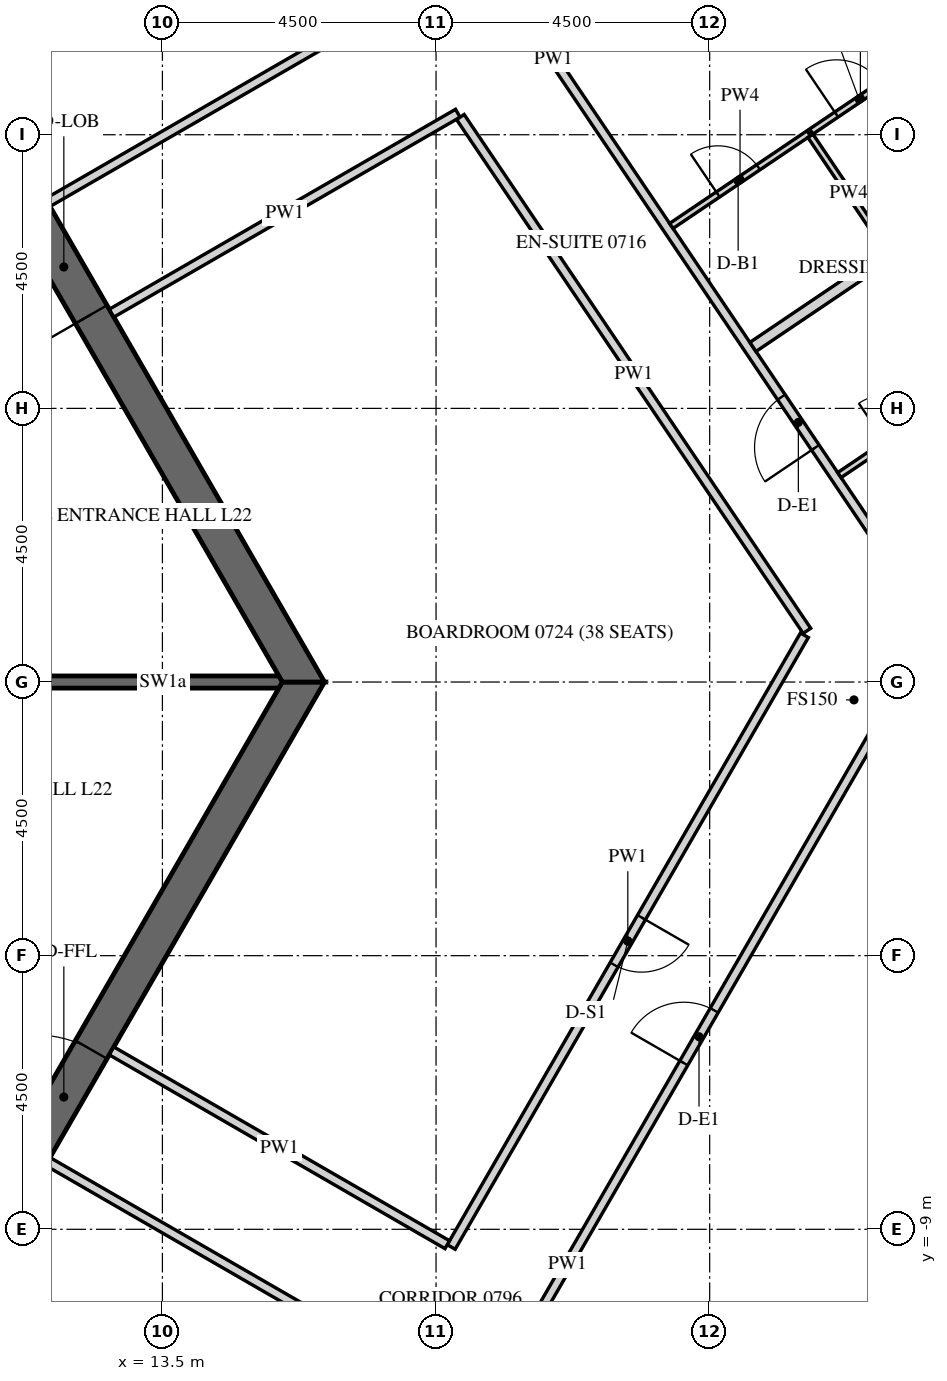
"""IFC4 building model, lengths in metres.
Left out: names, types, materials, properties, quantities, classifications, styles, units other than length and angle.
Written with IfcOpenShell. Run it as: python <this file> out.ifc"""

import sys

from ifc_helpers import new_model, si_unit, direction, frame, frame_2d, origin, place, context, subcontext, project, spatial, polyline, rectangle, outline, extrude, element, fill, save


model = new_model("IFC4")
c1 = context("Model", 3, precision=1e-05, world=origin(), true_north=direction((0.0, 1.0)))
c2 = subcontext(c1, "Body", "Model", "MODEL_VIEW")
j1 = project(units=[si_unit("LENGTHUNIT", "METRE"), si_unit("PLANEANGLEUNIT", "RADIAN")], contexts=[c1])
p1 = place(None, origin())
s1 = spatial("IfcSite", under=j1, at=p1, CompositionType="ELEMENT")
p2 = place(p1, origin())
s2 = spatial("IfcBuilding", under=s1, at=p2, CompositionType="ELEMENT")
p3 = place(p2, frame((0.0, 0.0, 99.9)))
s3 = spatial("IfcBuildingStorey", under=s2, at=p3, CompositionType="ELEMENT", Elevation=99.9)
p4 = place(p3, frame((18.83, -26.835, -0.15), z_axis=(0.0, 0.0, 1.0), x_axis=(0.500003800416, 0.866023209602, 0.0)))
e1 = element("IfcWall", 1, at=p4, inside=s3, PredefinedType="SOLIDWALL", context=c2, shape_type="SweptSolid", body=[
    extrude(outline(polyline([(-0.022, -0.275), (30.097, -0.275), (30.045, 0.275), (0.022, 0.275), (-0.022, -0.275)])), origin(), (0.0, 0.0, 1.0), 3.9),
])
p5 = place(p4, frame((1.236, 0.0, 1.05)))
e2 = element("IfcOpeningElement", 2, at=p5, cuts=e1, PredefinedType="OPENING", context=c2, shape_type="SweptSolid", body=[
    extrude(rectangle(XDim=2.4, YDim=2.4, at=frame_2d((1.2, 1.2))), frame((0.0, 0.285, 0.0), z_axis=(0.0, -1.0, 0.0), x_axis=(1.0, 0.0, 0.0)), (0.0, 0.0, 1.0), 0.57),
])
p6 = place(p4, frame((4.835, 0.0, 1.05)))
e3 = element("IfcOpeningElement", 3, at=p6, cuts=e1, PredefinedType="OPENING", context=c2, shape_type="SweptSolid", body=[
    extrude(rectangle(XDim=2.4, YDim=2.4, at=frame_2d((1.2, 1.2))), frame((0.0, 0.285, 0.0), z_axis=(0.0, -1.0, 0.0), x_axis=(1.0, 0.0, 0.0)), (0.0, 0.0, 1.0), 0.57),
])
p7 = place(p4, frame((8.436, 0.0, 1.05)))
e4 = element("IfcOpeningElement", 4, at=p7, cuts=e1, PredefinedType="OPENING", context=c2, shape_type="SweptSolid", body=[
    extrude(rectangle(XDim=2.4, YDim=2.4, at=frame_2d((1.2, 1.2))), frame((0.0, 0.285, 0.0), z_axis=(0.0, -1.0, 0.0), x_axis=(1.0, 0.0, 0.0)), (0.0, 0.0, 1.0), 0.57),
])
p8 = place(p4, frame((12.035, 0.0, 1.05)))
e5 = element("IfcOpeningElement", 5, at=p8, cuts=e1, PredefinedType="OPENING", context=c2, shape_type="SweptSolid", body=[
    extrude(rectangle(XDim=2.4, YDim=2.4, at=frame_2d((1.2, 1.2))), frame((0.0, 0.285, 0.0), z_axis=(0.0, -1.0, 0.0), x_axis=(1.0, 0.0, 0.0)), (0.0, 0.0, 1.0), 0.57),
])
p9 = place(p4, frame((15.635, 0.0, 1.05)))
e6 = element("IfcOpeningElement", 6, at=p9, cuts=e1, PredefinedType="OPENING", context=c2, shape_type="SweptSolid", body=[
    extrude(rectangle(XDim=2.4, YDim=2.4, at=frame_2d((1.2, 1.2))), frame((0.0, 0.285, 0.0), z_axis=(0.0, -1.0, 0.0), x_axis=(1.0, 0.0, 0.0)), (0.0, 0.0, 1.0), 0.57),
])
p10 = place(p4, frame((19.236, 0.0, 1.05)))
e7 = element("IfcOpeningElement", 7, at=p10, cuts=e1, PredefinedType="OPENING", context=c2, shape_type="SweptSolid", body=[
    extrude(rectangle(XDim=2.4, YDim=2.4, at=frame_2d((1.2, 1.2))), frame((0.0, 0.285, 0.0), z_axis=(0.0, -1.0, 0.0), x_axis=(1.0, 0.0, 0.0)), (0.0, 0.0, 1.0), 0.57),
])
p11 = place(p4, frame((22.835, 0.0, 1.05)))
e8 = element("IfcOpeningElement", 8, at=p11, cuts=e1, PredefinedType="OPENING", context=c2, shape_type="SweptSolid", body=[
    extrude(rectangle(XDim=2.4, YDim=2.4, at=frame_2d((1.2, 1.2))), frame((0.0, 0.285, 0.0), z_axis=(0.0, -1.0, 0.0), x_axis=(1.0, 0.0, 0.0)), (0.0, 0.0, 1.0), 0.57),
])
p12 = place(p4, frame((26.436, 0.0, 1.05)))
e9 = element("IfcOpeningElement", 9, at=p12, cuts=e1, PredefinedType="OPENING", context=c2, shape_type="SweptSolid", body=[
    extrude(rectangle(XDim=2.4, YDim=2.4, at=frame_2d((1.2, 1.2))), frame((0.0, 0.285, 0.0), z_axis=(0.0, -1.0, 0.0), x_axis=(1.0, 0.0, 0.0)), (0.0, 0.0, 1.0), 0.57),
])
p13 = place(p3, frame((33.728, 3.153, -0.15), z_axis=(0.0, 0.0, 1.0), x_axis=(-0.559192411416, 0.82903790445, 0.0)))
e10 = element("IfcWall", 10, at=p13, inside=s3, PredefinedType="SOLIDWALL", context=c2, shape_type="SweptSolid", body=[
    extrude(outline(polyline([(-0.026, -0.275), (30.093, -0.275), (30.048, 0.275), (0.026, 0.275), (-0.026, -0.275)])), origin(), (0.0, 0.0, 1.0), 3.9),
])
p14 = place(p13, frame((1.236, 0.0, 1.05)))
e11 = element("IfcOpeningElement", 11, at=p14, cuts=e10, PredefinedType="OPENING", context=c2, shape_type="SweptSolid", body=[
    extrude(rectangle(XDim=2.4, YDim=2.4, at=frame_2d((1.2, 1.2))), frame((0.0, 0.285, 0.0), z_axis=(0.0, -1.0, 0.0), x_axis=(1.0, 0.0, 0.0)), (0.0, 0.0, 1.0), 0.57),
])
p15 = place(p13, frame((4.835, 0.0, 1.05)))
e12 = element("IfcOpeningElement", 12, at=p15, cuts=e10, PredefinedType="OPENING", context=c2, shape_type="SweptSolid", body=[
    extrude(rectangle(XDim=2.4, YDim=2.4, at=frame_2d((1.2, 1.2))), frame((0.0, 0.285, 0.0), z_axis=(0.0, -1.0, 0.0), x_axis=(1.0, 0.0, 0.0)), (0.0, 0.0, 1.0), 0.57),
])
p16 = place(p13, frame((8.436, 0.0, 1.05)))
e13 = element("IfcOpeningElement", 13, at=p16, cuts=e10, PredefinedType="OPENING", context=c2, shape_type="SweptSolid", body=[
    extrude(rectangle(XDim=2.4, YDim=2.4, at=frame_2d((1.2, 1.2))), frame((0.0, 0.285, 0.0), z_axis=(0.0, -1.0, 0.0), x_axis=(1.0, 0.0, 0.0)), (0.0, 0.0, 1.0), 0.57),
])
p17 = place(p13, frame((12.035, 0.0, 1.05)))
e14 = element("IfcOpeningElement", 14, at=p17, cuts=e10, PredefinedType="OPENING", context=c2, shape_type="SweptSolid", body=[
    extrude(rectangle(XDim=2.4, YDim=2.4, at=frame_2d((1.2, 1.2))), frame((0.0, 0.285, 0.0), z_axis=(0.0, -1.0, 0.0), x_axis=(1.0, 0.0, 0.0)), (0.0, 0.0, 1.0), 0.57),
])
p18 = place(p13, frame((15.635, 0.0, 1.05)))
e15 = element("IfcOpeningElement", 15, at=p18, cuts=e10, PredefinedType="OPENING", context=c2, shape_type="SweptSolid", body=[
    extrude(rectangle(XDim=2.4, YDim=2.4, at=frame_2d((1.2, 1.2))), frame((0.0, 0.285, 0.0), z_axis=(0.0, -1.0, 0.0), x_axis=(1.0, 0.0, 0.0)), (0.0, 0.0, 1.0), 0.57),
])
p19 = place(p13, frame((19.236, 0.0, 1.05)))
e16 = element("IfcOpeningElement", 16, at=p19, cuts=e10, PredefinedType="OPENING", context=c2, shape_type="SweptSolid", body=[
    extrude(rectangle(XDim=2.4, YDim=2.4, at=frame_2d((1.2, 1.2))), frame((0.0, 0.285, 0.0), z_axis=(0.0, -1.0, 0.0), x_axis=(1.0, 0.0, 0.0)), (0.0, 0.0, 1.0), 0.57),
])
p20 = place(p13, frame((22.835, 0.0, 1.05)))
e17 = element("IfcOpeningElement", 17, at=p20, cuts=e10, PredefinedType="OPENING", context=c2, shape_type="SweptSolid", body=[
    extrude(rectangle(XDim=2.4, YDim=2.4, at=frame_2d((1.2, 1.2))), frame((0.0, 0.285, 0.0), z_axis=(0.0, -1.0, 0.0), x_axis=(1.0, 0.0, 0.0)), (0.0, 0.0, 1.0), 0.57),
])
p21 = place(p13, frame((26.436, 0.0, 1.05)))
e18 = element("IfcOpeningElement", 18, at=p21, cuts=e10, PredefinedType="OPENING", context=c2, shape_type="SweptSolid", body=[
    extrude(rectangle(XDim=2.4, YDim=2.4, at=frame_2d((1.2, 1.2))), frame((0.0, 0.285, 0.0), z_axis=(0.0, -1.0, 0.0), x_axis=(1.0, 0.0, 0.0)), (0.0, 0.0, 1.0), 0.57),
])
p22 = place(p3, frame((7.91, -13.7, -0.15), z_axis=(0.0, 0.0, 1.0), x_axis=(0.499999880136, 0.866025472988, 0.0)))
e19 = element("IfcWall", 19, at=p22, inside=s3, PredefinedType="SHEAR", context=c2, shape_type="SweptSolid", body=[
    extrude(outline(polyline([(-0.173, -0.3), (15.993, -0.3), (15.646, 0.3), (0.173, 0.3), (-0.173, -0.3)])), origin(), (0.0, 0.0, 1.0), 3.9),
])
p23 = place(p22, frame((7.039, 0.0, 0.15)))
e20 = element("IfcOpeningElement", 20, at=p23, cuts=e19, PredefinedType="OPENING", context=c2, shape_type="SweptSolid", body=[
    extrude(rectangle(XDim=1.8, YDim=2.4, at=frame_2d((0.9, 1.2))), frame((0.0, 0.31, 0.0), z_axis=(0.0, -1.0, 0.0), x_axis=(1.0, 0.0, 0.0)), (0.0, 0.0, 1.0), 0.62),
])
p24 = place(p3, frame((15.819, 0.0, -0.15), z_axis=(0.0, 0.0, 1.0), x_axis=(-0.499999880136, 0.866025472988, 0.0)))
e21 = element("IfcWall", 21, at=p24, inside=s3, PredefinedType="SHEAR", context=c2, shape_type="SweptSolid", body=[
    extrude(outline(polyline([(-0.173, -0.3), (15.993, -0.3), (15.646, 0.3), (0.173, 0.3), (-0.173, -0.3)])), origin(), (0.0, 0.0, 1.0), 3.9),
])
p25 = place(p24, frame((6.981, 0.0, 0.15)))
e22 = element("IfcOpeningElement", 22, at=p25, cuts=e21, PredefinedType="OPENING", context=c2, shape_type="SweptSolid", body=[
    extrude(rectangle(XDim=1.8, YDim=2.4, at=frame_2d((0.9, 1.2))), frame((0.0, 0.31, 0.0), z_axis=(0.0, -1.0, 0.0), x_axis=(1.0, 0.0, 0.0)), (0.0, 0.0, 1.0), 0.62),
])
p26 = place(p3, frame((11.547, 0.0, -0.15), z_axis=(0.0, 0.0, 1.0), x_axis=(1.0, 0.0, 0.0)))
e23 = element("IfcWall", 23, at=p26, inside=s3, PredefinedType="SHEAR", context=c2, shape_type="SweptSolid", body=[
    extrude(rectangle(XDim=3.926, YDim=0.2, at=frame_2d((1.963, 0.0))), origin(), (0.0, 0.0, 1.0), 3.9),
])
p27 = place(p3, frame((14.102, -20.075, 0.0), z_axis=(0.0, 0.0, 1.0), x_axis=(0.499996816197, 0.866027241946, 0.0)))
e24 = element("IfcWall", 24, at=p27, inside=s3, PredefinedType="PARTITIONING", context=c2, shape_type="SweptSolid", body=[
    extrude(rectangle(XDim=24.238, YDim=0.15, at=frame_2d((12.119, 0.0))), origin(), (0.0, 0.0, 1.0), 2.988),
])
p28 = place(p27, frame((4.729, 0.0, 0.0)))
e25 = element("IfcOpeningElement", 25, at=p28, cuts=e24, PredefinedType="OPENING", context=c2, shape_type="SweptSolid", body=[
    extrude(rectangle(XDim=1.0, YDim=2.1, at=frame_2d((0.5, 1.05))), frame((0.0, 0.085, 0.0), z_axis=(0.0, -1.0, 0.0), x_axis=(1.0, 0.0, 0.0)), (0.0, 0.0, 1.0), 0.17),
])
p29 = place(p27, frame((15.946, 0.0, 0.0)))
e26 = element("IfcOpeningElement", 26, at=p29, cuts=e24, PredefinedType="OPENING", context=c2, shape_type="SweptSolid", body=[
    extrude(rectangle(XDim=1.0, YDim=2.1, at=frame_2d((0.5, 1.05))), frame((0.0, 0.085, 0.0), z_axis=(0.0, -1.0, 0.0), x_axis=(1.0, 0.0, 0.0)), (0.0, 0.0, 1.0), 0.17),
])
p30 = place(p3, frame((26.174, 0.985, 0.0), z_axis=(0.0, 0.0, 1.0), x_axis=(-0.559192163771, 0.829038071488, 0.0)))
e27 = element("IfcWall", 27, at=p30, inside=s3, PredefinedType="PARTITIONING", context=c2, shape_type="SweptSolid", body=[
    extrude(rectangle(XDim=22.335, YDim=0.15, at=frame_2d((11.168, 0.0))), origin(), (0.0, 0.0, 1.0), 2.988),
])
p31 = place(p30, frame((3.463, 0.0, 0.0)))
e28 = element("IfcOpeningElement", 28, at=p31, cuts=e27, PredefinedType="OPENING", context=c2, shape_type="SweptSolid", body=[
    extrude(rectangle(XDim=1.0, YDim=2.1, at=frame_2d((0.5, 1.05))), frame((0.0, 0.085, 0.0), z_axis=(0.0, -1.0, 0.0), x_axis=(1.0, 0.0, 0.0)), (0.0, 0.0, 1.0), 0.17),
])
p32 = place(p30, frame((13.309, 0.0, 0.0)))
e29 = element("IfcOpeningElement", 29, at=p32, cuts=e27, PredefinedType="OPENING", context=c2, shape_type="SweptSolid", body=[
    extrude(rectangle(XDim=1.0, YDim=2.1, at=frame_2d((0.5, 1.05))), frame((0.0, 0.085, 0.0), z_axis=(0.0, -1.0, 0.0), x_axis=(1.0, 0.0, 0.0)), (0.0, 0.0, 1.0), 0.17),
])
p33 = place(p3, frame((12.664, 6.066, 0.0), z_axis=(0.0, 0.0, 1.0), x_axis=(0.866027295802, 0.499996722915, 0.0)))
e30 = element("IfcWall", 30, at=p33, inside=s3, PredefinedType="PARTITIONING", context=c2, shape_type="SweptSolid", body=[
    extrude(rectangle(XDim=6.575, YDim=0.15, at=frame_2d((3.288, 0.0))), origin(), (0.0, 0.0, 1.0), 2.988),
])
p34 = place(p3, frame((18.4, 9.291, 0.0), z_axis=(0.0, 0.0, 1.0), x_axis=(0.559191829043, -0.829038297265, 0.0)))
e31 = element("IfcWall", 31, at=p34, inside=s3, PredefinedType="PARTITIONING", context=c2, shape_type="SweptSolid", body=[
    extrude(rectangle(XDim=10.192, YDim=0.15, at=frame_2d((5.096, 0.0))), origin(), (0.0, 0.0, 1.0), 2.988),
])
p35 = place(p3, frame((24.058, 0.769, 0.0), z_axis=(0.0, 0.0, 1.0), x_axis=(-0.499995346943, -0.866028090212, 0.0)))
e32 = element("IfcWall", 32, at=p35, inside=s3, PredefinedType="PARTITIONING", context=c2, shape_type="SweptSolid", body=[
    extrude(rectangle(XDim=11.616, YDim=0.15, at=frame_2d((5.808, 0.0))), origin(), (0.0, 0.0, 1.0), 2.988),
])
p36 = place(p35, frame((5.358, 0.0, 0.0)))
e33 = element("IfcOpeningElement", 33, at=p36, cuts=e32, PredefinedType="OPENING", context=c2, shape_type="SweptSolid", body=[
    extrude(rectangle(XDim=0.9, YDim=2.1, at=frame_2d((0.45, 1.05))), frame((0.0, 0.085, 0.0), z_axis=(0.0, -1.0, 0.0), x_axis=(1.0, 0.0, 0.0)), (0.0, 0.0, 1.0), 0.17),
])
p37 = place(p3, frame((18.185, -9.253, 0.0), z_axis=(0.0, 0.0, 1.0), x_axis=(-0.866028703517, 0.499994284652, 0.0)))
e34 = element("IfcWall", 34, at=p37, inside=s3, PredefinedType="PARTITIONING", context=c2, shape_type="SweptSolid", body=[
    extrude(rectangle(XDim=6.375, YDim=0.15, at=frame_2d((3.188, 0.0))), origin(), (0.0, 0.0, 1.0), 2.988),
])
p38 = place(p3, frame((11.614, -7.884, 0.0), z_axis=(0.0, 0.0, 1.0), x_axis=(0.866021702275, -0.500006411147, 0.0)))
e35 = element("IfcWall", 35, at=p38, inside=s3, PredefinedType="PARTITIONING", context=c2, shape_type="SweptSolid", body=[
    extrude(rectangle(XDim=6.45, YDim=0.15, at=frame_2d((3.225, 0.0))), origin(), (0.0, 0.0, 1.0), 2.988),
])
p39 = place(p3, frame((17.116, 11.061, 0.0), z_axis=(0.0, 0.0, 1.0), x_axis=(-0.866021127751, -0.500007406234, 0.0)))
e36 = element("IfcWall", 36, at=p39, inside=s3, PredefinedType="PARTITIONING", context=c2, shape_type="SweptSolid", body=[
    extrude(rectangle(XDim=6.354, YDim=0.15, at=frame_2d((3.177, 0.0))), origin(), (0.0, 0.0, 1.0), 2.988),
])
p40 = place(p3, frame((24.633, 3.403, 0.0), z_axis=(0.0, 0.0, 1.0), x_axis=(0.829047014003, 0.559178905694, 0.0)))
e37 = element("IfcWall", 37, at=p40, inside=s3, PredefinedType="PARTITIONING", context=c2, shape_type="SweptSolid", body=[
    extrude(rectangle(XDim=2.725, YDim=0.1, at=frame_2d((1.362, 0.0))), origin(), (0.0, 0.0, 1.0), 2.988),
])
p41 = place(p40, frame((0.925, 0.0, 0.0)))
e38 = element("IfcOpeningElement", 38, at=p41, cuts=e37, PredefinedType="OPENING", context=c2, shape_type="SweptSolid", body=[
    extrude(rectangle(XDim=0.8, YDim=2.1, at=frame_2d((0.4, 1.05))), frame((0.0, 0.06, 0.0), z_axis=(0.0, -1.0, 0.0), x_axis=(1.0, 0.0, 0.0)), (0.0, 0.0, 1.0), 0.12),
])
p42 = place(p3, frame((29.119, 9.495, 0.0), z_axis=(0.0, 0.0, 1.0), x_axis=(-0.829049225145, -0.559175627408, 0.0)))
e39 = element("IfcWall", 39, at=p42, inside=s3, PredefinedType="PARTITIONING", context=c2, shape_type="SweptSolid", body=[
    extrude(rectangle(XDim=7.125, YDim=0.18, at=frame_2d((3.562, 0.0))), origin(), (0.0, 0.0, 1.0), 2.988),
])
p43 = place(p3, frame((21.87, 7.5, 0.0), z_axis=(0.0, 0.0, 1.0), x_axis=(0.829005477618, 0.559240483226, 0.0)))
e40 = element("IfcWall", 40, at=p43, inside=s3, PredefinedType="PARTITIONING", context=c2, shape_type="SweptSolid", body=[
    extrude(rectangle(XDim=2.725, YDim=0.1, at=frame_2d((1.363, 0.0))), origin(), (0.0, 0.0, 1.0), 2.988),
])
p44 = place(p43, frame((0.925, 0.0, 0.0)))
e41 = element("IfcOpeningElement", 41, at=p44, cuts=e40, PredefinedType="OPENING", context=c2, shape_type="SweptSolid", body=[
    extrude(rectangle(XDim=0.8, YDim=2.1, at=frame_2d((0.4, 1.05))), frame((0.0, 0.06, 0.0), z_axis=(0.0, -1.0, 0.0), x_axis=(1.0, 0.0, 0.0)), (0.0, 0.0, 1.0), 0.12),
])
p45 = place(p3, frame((24.17, 9.052, 0.0), z_axis=(0.0, 0.0, 1.0), x_axis=(0.829014089772, 0.559227716552, 0.0)))
e42 = element("IfcWall", 42, at=p45, inside=s3, PredefinedType="PARTITIONING", context=c2, shape_type="SweptSolid", body=[
    extrude(rectangle(XDim=1.95, YDim=0.1, at=frame_2d((0.975, 0.0))), origin(), (0.0, 0.0, 1.0), 2.988),
])
p46 = place(p45, frame((0.5, 0.0, 0.0)))
e43 = element("IfcOpeningElement", 43, at=p46, cuts=e42, PredefinedType="OPENING", context=c2, shape_type="SweptSolid", body=[
    extrude(rectangle(XDim=0.9, YDim=2.1, at=frame_2d((0.45, 1.05))), frame((0.0, 0.06, 0.0), z_axis=(0.0, -1.0, 0.0), x_axis=(1.0, 0.0, 0.0)), (0.0, 0.0, 1.0), 0.12),
])
p47 = place(p3, frame((25.42, 7.109, 0.0), z_axis=(0.0, 0.0, 1.0), x_axis=(-0.559179660023, 0.829046505219, 0.0)))
e44 = element("IfcWall", 44, at=p47, inside=s3, PredefinedType="PARTITIONING", context=c2, shape_type="SweptSolid", body=[
    extrude(rectangle(XDim=2.26, YDim=0.1, at=frame_2d((1.13, 0.0))), origin(), (0.0, 0.0, 1.0), 2.988),
])
p48 = place(p25, origin())
e45 = element("IfcDoor", 45, at=p48, inside=s3, OperationType="DOUBLE_DOOR_SINGLE_SWING", PredefinedType="DOOR", context=c2, shape_type="SweptSolid", body=[
    extrude(rectangle(XDim=1.8, YDim=2.4, at=frame_2d((0.9, 1.2))), frame((0.0, 0.025, 0.0), z_axis=(0.0, -1.0, 0.0), x_axis=(1.0, 0.0, 0.0)), (0.0, 0.0, 1.0), 0.05),
])
fill(e22, e45)
p49 = place(p23, origin())
e46 = element("IfcDoor", 46, at=p49, inside=s3, OperationType="DOUBLE_DOOR_SINGLE_SWING", PredefinedType="DOOR", context=c2, shape_type="SweptSolid", body=[
    extrude(rectangle(XDim=1.8, YDim=2.4, at=frame_2d((0.9, 1.2))), frame((0.0, 0.025, 0.0), z_axis=(0.0, -1.0, 0.0), x_axis=(1.0, 0.0, 0.0)), (0.0, 0.0, 1.0), 0.05),
])
fill(e20, e46)
p50 = place(p29, origin())
e47 = element("IfcDoor", 47, at=p50, inside=s3, OperationType="SINGLE_SWING_LEFT", PredefinedType="DOOR", context=c2, shape_type="SweptSolid", body=[
    extrude(rectangle(XDim=1.0, YDim=2.1, at=frame_2d((0.5, 1.05))), frame((0.0, 0.025, 0.0), z_axis=(0.0, -1.0, 0.0), x_axis=(1.0, 0.0, 0.0)), (0.0, 0.0, 1.0), 0.05),
])
fill(e26, e47)
p51 = place(p31, origin())
e48 = element("IfcDoor", 48, at=p51, inside=s3, OperationType="SINGLE_SWING_LEFT", PredefinedType="DOOR", context=c2, shape_type="SweptSolid", body=[
    extrude(rectangle(XDim=1.0, YDim=2.1, at=frame_2d((0.5, 1.05))), frame((0.0, 0.025, 0.0), z_axis=(0.0, -1.0, 0.0), x_axis=(1.0, 0.0, 0.0)), (0.0, 0.0, 1.0), 0.05),
])
fill(e28, e48)
p52 = place(p44, origin())
e49 = element("IfcDoor", 49, at=p52, inside=s3, OperationType="SINGLE_SWING_RIGHT", PredefinedType="DOOR", context=c2, shape_type="SweptSolid", body=[
    extrude(rectangle(XDim=0.8, YDim=2.1, at=frame_2d((0.4, 1.05))), frame((0.0, 0.025, 0.0), z_axis=(0.0, -1.0, 0.0), x_axis=(1.0, 0.0, 0.0)), (0.0, 0.0, 1.0), 0.05),
])
fill(e41, e49)
p53 = place(p46, origin())
e50 = element("IfcDoor", 50, at=p53, inside=s3, OperationType="SINGLE_SWING_LEFT", PredefinedType="DOOR", context=c2, shape_type="SweptSolid", body=[
    extrude(rectangle(XDim=0.9, YDim=2.1, at=frame_2d((0.45, 1.05))), frame((0.0, 0.025, 0.0), z_axis=(0.0, -1.0, 0.0), x_axis=(1.0, 0.0, 0.0)), (0.0, 0.0, 1.0), 0.05),
])
fill(e43, e50)
p54 = place(p36, origin())
e51 = element("IfcDoor", 51, at=p54, inside=s3, OperationType="SINGLE_SWING_LEFT", PredefinedType="DOOR", context=c2, shape_type="SweptSolid", body=[
    extrude(rectangle(XDim=0.9, YDim=2.1, at=frame_2d((0.45, 1.05))), frame((0.0, 0.025, 0.0), z_axis=(0.0, -1.0, 0.0), x_axis=(1.0, 0.0, 0.0)), (0.0, 0.0, 1.0), 0.05),
])
fill(e33, e51)
save(model, sys.argv[1])
